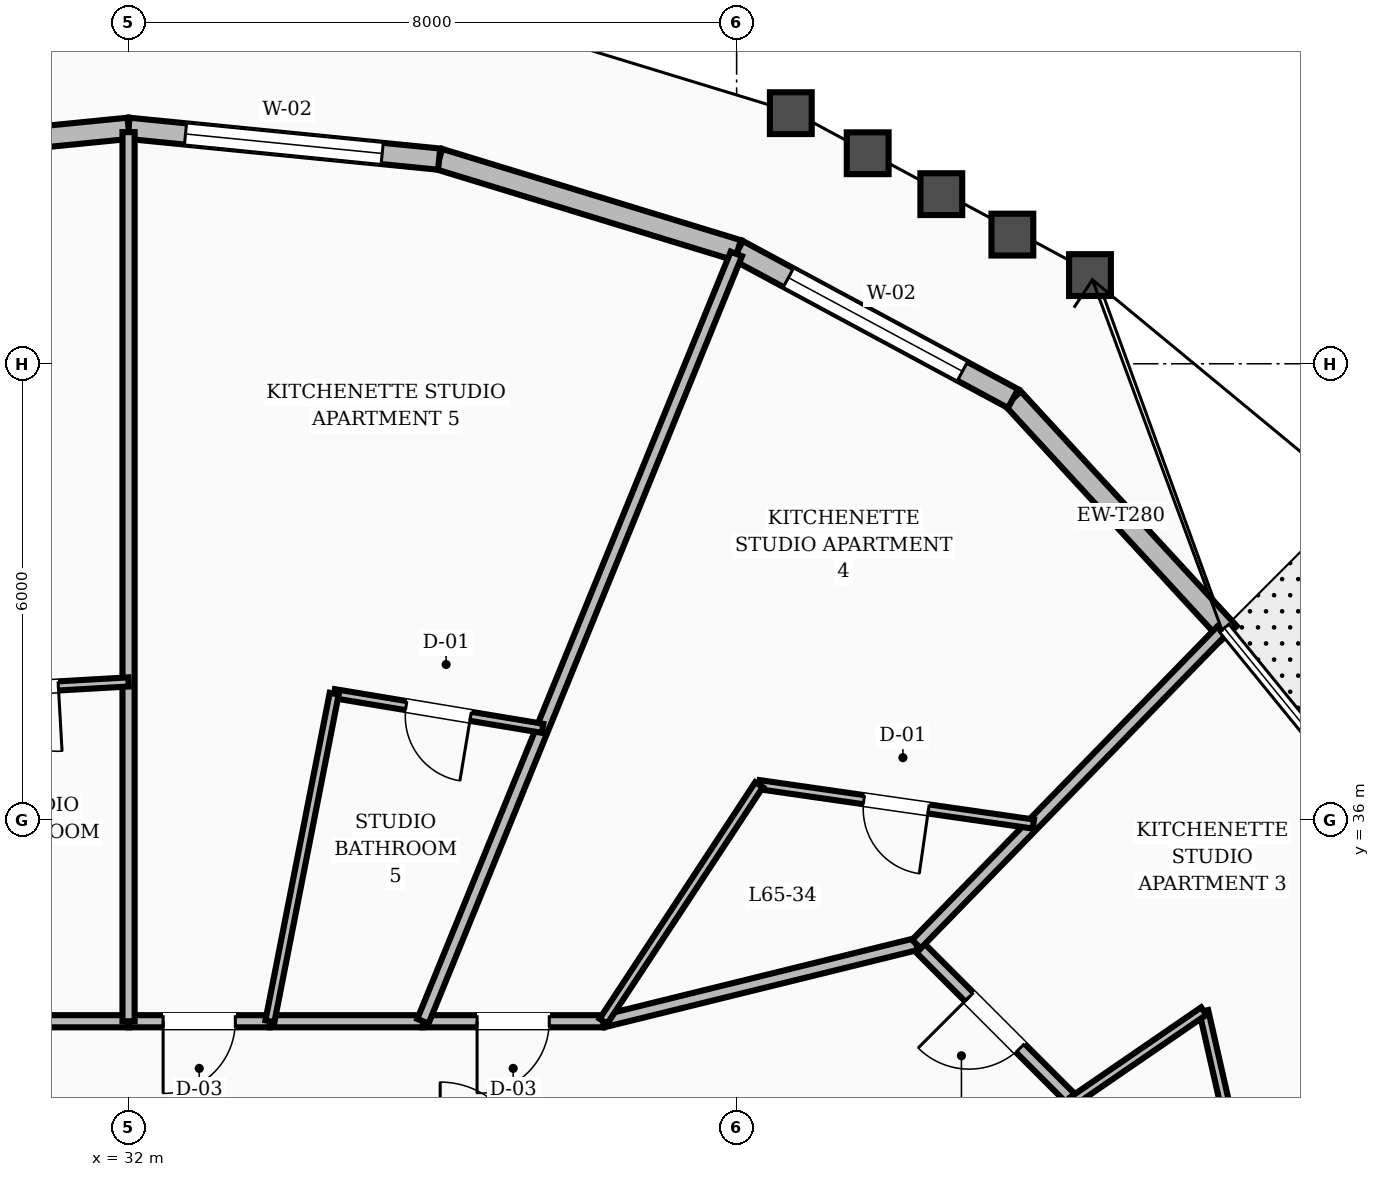
"""IFC4 building model, lengths in metres.
Left out: names, types, materials, properties, quantities, classifications, styles, units other than length and angle.
Written with IfcOpenShell. Run it as: python <this file> out.ifc"""

import sys

from ifc_helpers import new_model, si_unit, direction, frame, frame_2d, origin, place, context, subcontext, project, spatial, rectangle, extrude, element, fill, save


model = new_model("IFC4")
c1 = context("Model", 3, precision=1e-05, world=origin(), true_north=direction((0.0, 1.0)))
c2 = subcontext(c1, "Body", "Model", "MODEL_VIEW")
j1 = project(units=[si_unit("LENGTHUNIT", "METRE"), si_unit("PLANEANGLEUNIT", "RADIAN")], contexts=[c1])
p1 = place(None, origin())
s1 = spatial("IfcSite", under=j1, at=p1, CompositionType="ELEMENT")
p2 = place(p1, origin())
s2 = spatial("IfcBuilding", under=s1, at=p2, CompositionType="ELEMENT")
p3 = place(p2, frame((0.0, 0.0, 250.8)))
s3 = spatial("IfcBuildingStorey", under=s2, at=p3, CompositionType="ELEMENT", Elevation=250.8)
p4 = place(p3, frame((46.477, 38.455, 0.0), z_axis=(0.0, 0.0, 1.0), x_axis=(-0.677046444882, 0.735940290698, 0.0)))
e1 = element("IfcWall", 1, at=p4, inside=s3, PredefinedType="STANDARD", context=c2, shape_type="SweptSolid", body=[
    extrude(rectangle(XDim=4.195, YDim=0.28, at=frame_2d((2.098, 0.0))), origin(), (0.0, 0.0, 1.0), 2.88),
])
p5 = place(p3, frame((43.636, 41.542, 0.0), z_axis=(0.0, 0.0, 1.0), x_axis=(-0.880482536711, 0.474078582671, 0.0)))
e2 = element("IfcWall", 2, at=p5, inside=s3, PredefinedType="STANDARD", context=c2, shape_type="SweptSolid", body=[
    extrude(rectangle(XDim=4.113, YDim=0.28, at=frame_2d((2.056, 0.0))), origin(), (0.0, 0.0, 1.0), 2.88),
])
p6 = place(p5, frame((0.756, 0.0, 0.8)))
e3 = element("IfcOpeningElement", 3, at=p6, cuts=e2, PredefinedType="OPENING", context=c2, shape_type="SweptSolid", body=[
    extrude(rectangle(XDim=2.6, YDim=1.65, at=frame_2d((1.3, 0.825))), frame((0.0, 0.15, 0.0), z_axis=(0.0, -1.0, 0.0), x_axis=(1.0, 0.0, 0.0)), (0.0, 0.0, 1.0), 0.3),
])
p7 = place(p3, frame((40.015, 43.492, 0.0), z_axis=(0.0, 0.0, 1.0), x_axis=(-0.956361719018, 0.292185322009, 0.0)))
e4 = element("IfcWall", 4, at=p7, inside=s3, PredefinedType="STANDARD", context=c2, shape_type="SweptSolid", body=[
    extrude(rectangle(XDim=4.108, YDim=0.28, at=frame_2d((2.054, 0.0))), origin(), (0.0, 0.0, 1.0), 2.88),
])
p8 = place(p3, frame((36.086, 44.692, 0.0), z_axis=(0.0, 0.0, 1.0), x_axis=(-0.995111670603, 0.098756078441, 0.0)))
e5 = element("IfcWall", 5, at=p8, inside=s3, PredefinedType="STANDARD", context=c2, shape_type="SweptSolid", body=[
    extrude(rectangle(XDim=4.106, YDim=0.28, at=frame_2d((2.053, 0.0))), origin(), (0.0, 0.0, 1.0), 2.88),
])
p9 = place(p8, frame((0.753, 0.0, 0.8)))
e6 = element("IfcOpeningElement", 6, at=p9, cuts=e5, PredefinedType="OPENING", context=c2, shape_type="SweptSolid", body=[
    extrude(rectangle(XDim=2.6, YDim=1.65, at=frame_2d((1.3, 0.825))), frame((0.0, 0.15, 0.0), z_axis=(0.0, -1.0, 0.0), x_axis=(1.0, 0.0, 0.0)), (0.0, 0.0, 1.0), 0.3),
])
p10 = place(p3, frame((32.0, 45.098, 0.0), z_axis=(0.0, 0.0, 1.0), x_axis=(-0.995111670603, -0.098756078441, 0.0)))
e7 = element("IfcWall", 7, at=p10, inside=s3, PredefinedType="STANDARD", context=c2, shape_type="SweptSolid", body=[
    extrude(rectangle(XDim=4.106, YDim=0.28, at=frame_2d((2.053, 0.0))), origin(), (0.0, 0.0, 1.0), 2.88),
])
p11 = place(p3, frame((44.427, 32.303, 0.0), z_axis=(0.0, 0.0, 1.0), x_axis=(-0.707106781187, 0.707106781187, 0.0)))
e8 = element("IfcWall", 8, at=p11, inside=s3, PredefinedType="SOLIDWALL", context=c2, shape_type="SweptSolid", body=[
    extrude(rectangle(XDim=2.916, YDim=0.16, at=frame_2d((1.458, 0.0))), origin(), (0.0, 0.0, 1.0), 2.87),
])
p12 = place(p11, frame((0.983, 0.0, 0.0)))
e9 = element("IfcOpeningElement", 9, at=p12, cuts=e8, PredefinedType="OPENING", context=c2, shape_type="SweptSolid", body=[
    extrude(rectangle(XDim=0.95, YDim=2.1, at=frame_2d((0.475, 1.05))), frame((0.0, 0.09, 0.0), z_axis=(0.0, -1.0, 0.0), x_axis=(1.0, 0.0, 0.0)), (0.0, 0.0, 1.0), 0.18),
])
p13 = place(p3, frame((42.365, 34.365, 0.0), z_axis=(0.0, 0.0, 1.0), x_axis=(-0.970939799552, -0.239323850978, 0.0)))
e10 = element("IfcWall", 10, at=p13, inside=s3, PredefinedType="SOLIDWALL", context=c2, shape_type="SweptSolid", body=[
    extrude(rectangle(XDim=4.241, YDim=0.16, at=frame_2d((2.12, 0.0))), origin(), (0.0, 0.0, 1.0), 2.87),
])
p14 = place(p3, frame((38.248, 33.35, 0.0), z_axis=(0.0, 0.0, 1.0), x_axis=(-1.0, 0.0, 0.0)))
e11 = element("IfcWall", 11, at=p14, inside=s3, PredefinedType="SOLIDWALL", context=c2, shape_type="SweptSolid", body=[
    extrude(rectangle(XDim=2.375, YDim=0.16, at=frame_2d((1.188, 0.0))), origin(), (0.0, 0.0, 1.0), 2.87),
])
p15 = place(p14, frame((0.712, 0.0, 0.0)))
e12 = element("IfcOpeningElement", 12, at=p15, cuts=e11, PredefinedType="OPENING", context=c2, shape_type="SweptSolid", body=[
    extrude(rectangle(XDim=0.95, YDim=2.1, at=frame_2d((0.475, 1.05))), frame((0.0, 0.09, 0.0), z_axis=(0.0, -1.0, 0.0), x_axis=(1.0, 0.0, 0.0)), (0.0, 0.0, 1.0), 0.18),
])
p16 = place(p3, frame((35.873, 33.35, 0.0), z_axis=(0.0, 0.0, 1.0), x_axis=(-1.0, 0.0, 0.0)))
e13 = element("IfcWall", 13, at=p16, inside=s3, PredefinedType="SOLIDWALL", context=c2, shape_type="SweptSolid", body=[
    extrude(rectangle(XDim=2.013, YDim=0.16, at=frame_2d((1.006, 0.0))), origin(), (0.0, 0.0, 1.0), 2.87),
])
p17 = place(p3, frame((33.86, 33.35, 0.0), z_axis=(0.0, 0.0, 1.0), x_axis=(-1.0, 0.0, 0.0)))
e14 = element("IfcWall", 14, at=p17, inside=s3, PredefinedType="SOLIDWALL", context=c2, shape_type="SweptSolid", body=[
    extrude(rectangle(XDim=1.86, YDim=0.16, at=frame_2d((0.93, 0.0))), origin(), (0.0, 0.0, 1.0), 2.87),
])
p18 = place(p17, frame((0.455, 0.0, 0.0)))
e15 = element("IfcOpeningElement", 15, at=p18, cuts=e14, PredefinedType="OPENING", context=c2, shape_type="SweptSolid", body=[
    extrude(rectangle(XDim=0.95, YDim=2.1, at=frame_2d((0.475, 1.05))), frame((0.0, 0.09, 0.0), z_axis=(0.0, -1.0, 0.0), x_axis=(1.0, 0.0, 0.0)), (0.0, 0.0, 1.0), 0.18),
])
p19 = place(p3, frame((32.0, 33.35, 0.0), z_axis=(0.0, 0.0, 1.0), x_axis=(-1.0, 0.0, 0.0)))
e16 = element("IfcWall", 16, at=p19, inside=s3, PredefinedType="SOLIDWALL", context=c2, shape_type="SweptSolid", body=[
    extrude(rectangle(XDim=1.86, YDim=0.16, at=frame_2d((0.93, 0.0))), origin(), (0.0, 0.0, 1.0), 2.87),
])
p20 = place(p3, frame((46.894, 30.192, 0.0), z_axis=(0.0, 0.0, 1.0), x_axis=(-0.221774244265, 0.975098038446, 0.0)))
e17 = element("IfcWall", 17, at=p20, inside=s3, PredefinedType="PARTITIONING", context=c2, shape_type="SweptSolid", body=[
    extrude(rectangle(XDim=3.376, YDim=0.12, at=frame_2d((1.688, 0.0))), origin(), (0.0, 0.0, 1.0), 2.87),
])
p21 = place(p20, frame((1.258, 0.0, 0.0)))
e18 = element("IfcOpeningElement", 18, at=p21, cuts=e17, PredefinedType="OPENING", context=c2, shape_type="SweptSolid", body=[
    extrude(rectangle(XDim=0.86, YDim=2.1, at=frame_2d((0.43, 1.05))), frame((0.0, 0.07, 0.0), z_axis=(0.0, -1.0, 0.0), x_axis=(1.0, 0.0, 0.0)), (0.0, 0.0, 1.0), 0.14),
])
p22 = place(p3, frame((44.427, 32.303, 0.0), z_axis=(0.0, 0.0, 1.0), x_axis=(0.824260499572, 0.566210763626, 0.0)))
e19 = element("IfcWall", 19, at=p22, inside=s3, PredefinedType="PARTITIONING", context=c2, shape_type="SweptSolid", body=[
    extrude(rectangle(XDim=2.085, YDim=0.12, at=frame_2d((1.042, 0.0))), origin(), (0.0, 0.0, 1.0), 2.87),
])
p23 = place(p3, frame((42.365, 34.365, 0.0), z_axis=(0.0, 0.0, 1.0), x_axis=(0.697753092732, 0.716338342952, 0.0)))
e20 = element("IfcWall", 20, at=p23, inside=s3, PredefinedType="SOLIDWALL", context=c2, shape_type="SweptSolid", body=[
    extrude(rectangle(XDim=5.754, YDim=0.16, at=frame_2d((2.877, 0.0))), origin(), (0.0, 0.0, 1.0), 2.87),
])
p24 = place(p3, frame((43.904, 35.945, 0.0), z_axis=(0.0, 0.0, 1.0), x_axis=(-0.989850131558, 0.142115154206, 0.0)))
e21 = element("IfcWall", 21, at=p24, inside=s3, PredefinedType="PARTITIONING", context=c2, shape_type="SweptSolid", body=[
    extrude(rectangle(XDim=3.646, YDim=0.12, at=frame_2d((1.823, 0.0))), origin(), (0.0, 0.0, 1.0), 2.87),
])
p25 = place(p24, frame((1.393, 0.0, 0.0)))
e22 = element("IfcOpeningElement", 22, at=p25, cuts=e21, PredefinedType="OPENING", context=c2, shape_type="SweptSolid", body=[
    extrude(rectangle(XDim=0.86, YDim=2.1, at=frame_2d((0.43, 1.05))), frame((0.0, 0.07, 0.0), z_axis=(0.0, -1.0, 0.0), x_axis=(1.0, 0.0, 0.0)), (0.0, 0.0, 1.0), 0.14),
])
p26 = place(p3, frame((38.248, 33.35, 0.0), z_axis=(0.0, 0.0, 1.0), x_axis=(0.549609280911, 0.835421832571, 0.0)))
e23 = element("IfcWall", 23, at=p26, inside=s3, PredefinedType="PARTITIONING", context=c2, shape_type="SweptSolid", body=[
    extrude(rectangle(XDim=3.726, YDim=0.12, at=frame_2d((1.863, 0.0))), origin(), (0.0, 0.0, 1.0), 2.87),
])
p27 = place(p3, frame((35.873, 33.35, 0.0), z_axis=(0.0, 0.0, 1.0), x_axis=(0.378155079747, 0.925742262005, 0.0)))
e24 = element("IfcWall", 24, at=p27, inside=s3, PredefinedType="SOLIDWALL", context=c2, shape_type="SweptSolid", body=[
    extrude(rectangle(XDim=10.905, YDim=0.16, at=frame_2d((5.453, 0.0))), origin(), (0.0, 0.0, 1.0), 2.87),
])
p28 = place(p3, frame((37.447, 37.204, 0.0), z_axis=(0.0, 0.0, 1.0), x_axis=(-0.986441372128, 0.164114043742, 0.0)))
e25 = element("IfcWall", 25, at=p28, inside=s3, PredefinedType="PARTITIONING", context=c2, shape_type="SweptSolid", body=[
    extrude(rectangle(XDim=2.779, YDim=0.12, at=frame_2d((1.389, 0.0))), origin(), (0.0, 0.0, 1.0), 2.87),
])
p29 = place(p28, frame((0.959, 0.0, 0.0)))
e26 = element("IfcOpeningElement", 26, at=p29, cuts=e25, PredefinedType="OPENING", context=c2, shape_type="SweptSolid", body=[
    extrude(rectangle(XDim=0.86, YDim=2.1, at=frame_2d((0.43, 1.05))), frame((0.0, 0.07, 0.0), z_axis=(0.0, -1.0, 0.0), x_axis=(1.0, 0.0, 0.0)), (0.0, 0.0, 1.0), 0.14),
])
p30 = place(p3, frame((33.86, 33.35, 0.0), z_axis=(0.0, 0.0, 1.0), x_axis=(0.192608630394, 0.981275657243, 0.0)))
e27 = element("IfcWall", 27, at=p30, inside=s3, PredefinedType="PARTITIONING", context=c2, shape_type="SweptSolid", body=[
    extrude(rectangle(XDim=4.392, YDim=0.12, at=frame_2d((2.196, 0.0))), origin(), (0.0, 0.0, 1.0), 2.87),
])
p31 = place(p3, frame((32.0, 33.35, 0.0), z_axis=(0.0, 0.0, 1.0), x_axis=(0.0, 1.0, 0.0)))
e28 = element("IfcWall", 28, at=p31, inside=s3, PredefinedType="SOLIDWALL", context=c2, shape_type="SweptSolid", body=[
    extrude(rectangle(XDim=11.698, YDim=0.16, at=frame_2d((5.849, 0.0))), origin(), (0.0, 0.0, 1.0), 2.87),
])
p32 = place(p3, frame((32.0, 37.814, 0.0), z_axis=(0.0, 0.0, 1.0), x_axis=(-0.998378070768, -0.056931782074, 0.0)))
e29 = element("IfcWall", 29, at=p32, inside=s3, PredefinedType="PARTITIONING", context=c2, shape_type="SweptSolid", body=[
    extrude(rectangle(XDim=2.71, YDim=0.12, at=frame_2d((1.355, 0.0))), origin(), (0.0, 0.0, 1.0), 2.87),
])
p33 = place(p32, frame((0.925, 0.0, 0.0)))
e30 = element("IfcOpeningElement", 30, at=p33, cuts=e29, PredefinedType="OPENING", context=c2, shape_type="SweptSolid", body=[
    extrude(rectangle(XDim=0.86, YDim=2.1, at=frame_2d((0.43, 1.05))), frame((0.0, 0.07, 0.0), z_axis=(0.0, -1.0, 0.0), x_axis=(1.0, 0.0, 0.0)), (0.0, 0.0, 1.0), 0.14),
])
p34 = place(p6, origin())
e31 = element("IfcWindow", 31, at=p34, inside=s3, PartitioningType="SINGLE_PANEL", PredefinedType="WINDOW", context=c2, shape_type="SweptSolid", body=[
    extrude(rectangle(XDim=2.6, YDim=1.65, at=frame_2d((1.3, 0.825))), frame((0.0, 0.03, 0.0), z_axis=(0.0, -1.0, 0.0), x_axis=(1.0, 0.0, 0.0)), (0.0, 0.0, 1.0), 0.06),
])
fill(e3, e31)
p35 = place(p9, origin())
e32 = element("IfcWindow", 32, at=p35, inside=s3, PartitioningType="SINGLE_PANEL", PredefinedType="WINDOW", context=c2, shape_type="SweptSolid", body=[
    extrude(rectangle(XDim=2.6, YDim=1.65, at=frame_2d((1.3, 0.825))), frame((0.0, 0.03, 0.0), z_axis=(0.0, -1.0, 0.0), x_axis=(1.0, 0.0, 0.0)), (0.0, 0.0, 1.0), 0.06),
])
fill(e6, e32)
p36 = place(p12, origin())
e33 = element("IfcDoor", 33, at=p36, inside=s3, OperationType="SINGLE_SWING_RIGHT", PredefinedType="DOOR", context=c2, shape_type="SweptSolid", body=[
    extrude(rectangle(XDim=0.95, YDim=2.1, at=frame_2d((0.475, 1.05))), frame((0.0, 0.025, 0.0), z_axis=(0.0, -1.0, 0.0), x_axis=(1.0, 0.0, 0.0)), (0.0, 0.0, 1.0), 0.05),
])
fill(e9, e33)
p37 = place(p25, origin())
e34 = element("IfcDoor", 34, at=p37, inside=s3, OperationType="SINGLE_SWING_LEFT", PredefinedType="DOOR", context=c2, shape_type="SweptSolid", body=[
    extrude(rectangle(XDim=0.86, YDim=2.1, at=frame_2d((0.43, 1.05))), frame((0.0, 0.025, 0.0), z_axis=(0.0, -1.0, 0.0), x_axis=(1.0, 0.0, 0.0)), (0.0, 0.0, 1.0), 0.05),
])
fill(e22, e34)
p38 = place(p15, origin())
e35 = element("IfcDoor", 35, at=p38, inside=s3, OperationType="SINGLE_SWING_RIGHT", PredefinedType="DOOR", context=c2, shape_type="SweptSolid", body=[
    extrude(rectangle(XDim=0.95, YDim=2.1, at=frame_2d((0.475, 1.05))), frame((0.0, 0.025, 0.0), z_axis=(0.0, -1.0, 0.0), x_axis=(1.0, 0.0, 0.0)), (0.0, 0.0, 1.0), 0.05),
])
fill(e12, e35)
p39 = place(p29, origin())
e36 = element("IfcDoor", 36, at=p39, inside=s3, OperationType="SINGLE_SWING_LEFT", PredefinedType="DOOR", context=c2, shape_type="SweptSolid", body=[
    extrude(rectangle(XDim=0.86, YDim=2.1, at=frame_2d((0.43, 1.05))), frame((0.0, 0.025, 0.0), z_axis=(0.0, -1.0, 0.0), x_axis=(1.0, 0.0, 0.0)), (0.0, 0.0, 1.0), 0.05),
])
fill(e26, e36)
p40 = place(p18, origin())
e37 = element("IfcDoor", 37, at=p40, inside=s3, OperationType="SINGLE_SWING_RIGHT", PredefinedType="DOOR", context=c2, shape_type="SweptSolid", body=[
    extrude(rectangle(XDim=0.95, YDim=2.1, at=frame_2d((0.475, 1.05))), frame((0.0, 0.025, 0.0), z_axis=(0.0, -1.0, 0.0), x_axis=(1.0, 0.0, 0.0)), (0.0, 0.0, 1.0), 0.05),
])
fill(e15, e37)
p41 = place(p33, origin())
e38 = element("IfcDoor", 38, at=p41, inside=s3, OperationType="SINGLE_SWING_LEFT", PredefinedType="DOOR", context=c2, shape_type="SweptSolid", body=[
    extrude(rectangle(XDim=0.86, YDim=2.1, at=frame_2d((0.43, 1.05))), frame((0.0, 0.025, 0.0), z_axis=(0.0, -1.0, 0.0), x_axis=(1.0, 0.0, 0.0)), (0.0, 0.0, 1.0), 0.05),
])
fill(e30, e38)
save(model, sys.argv[1])
